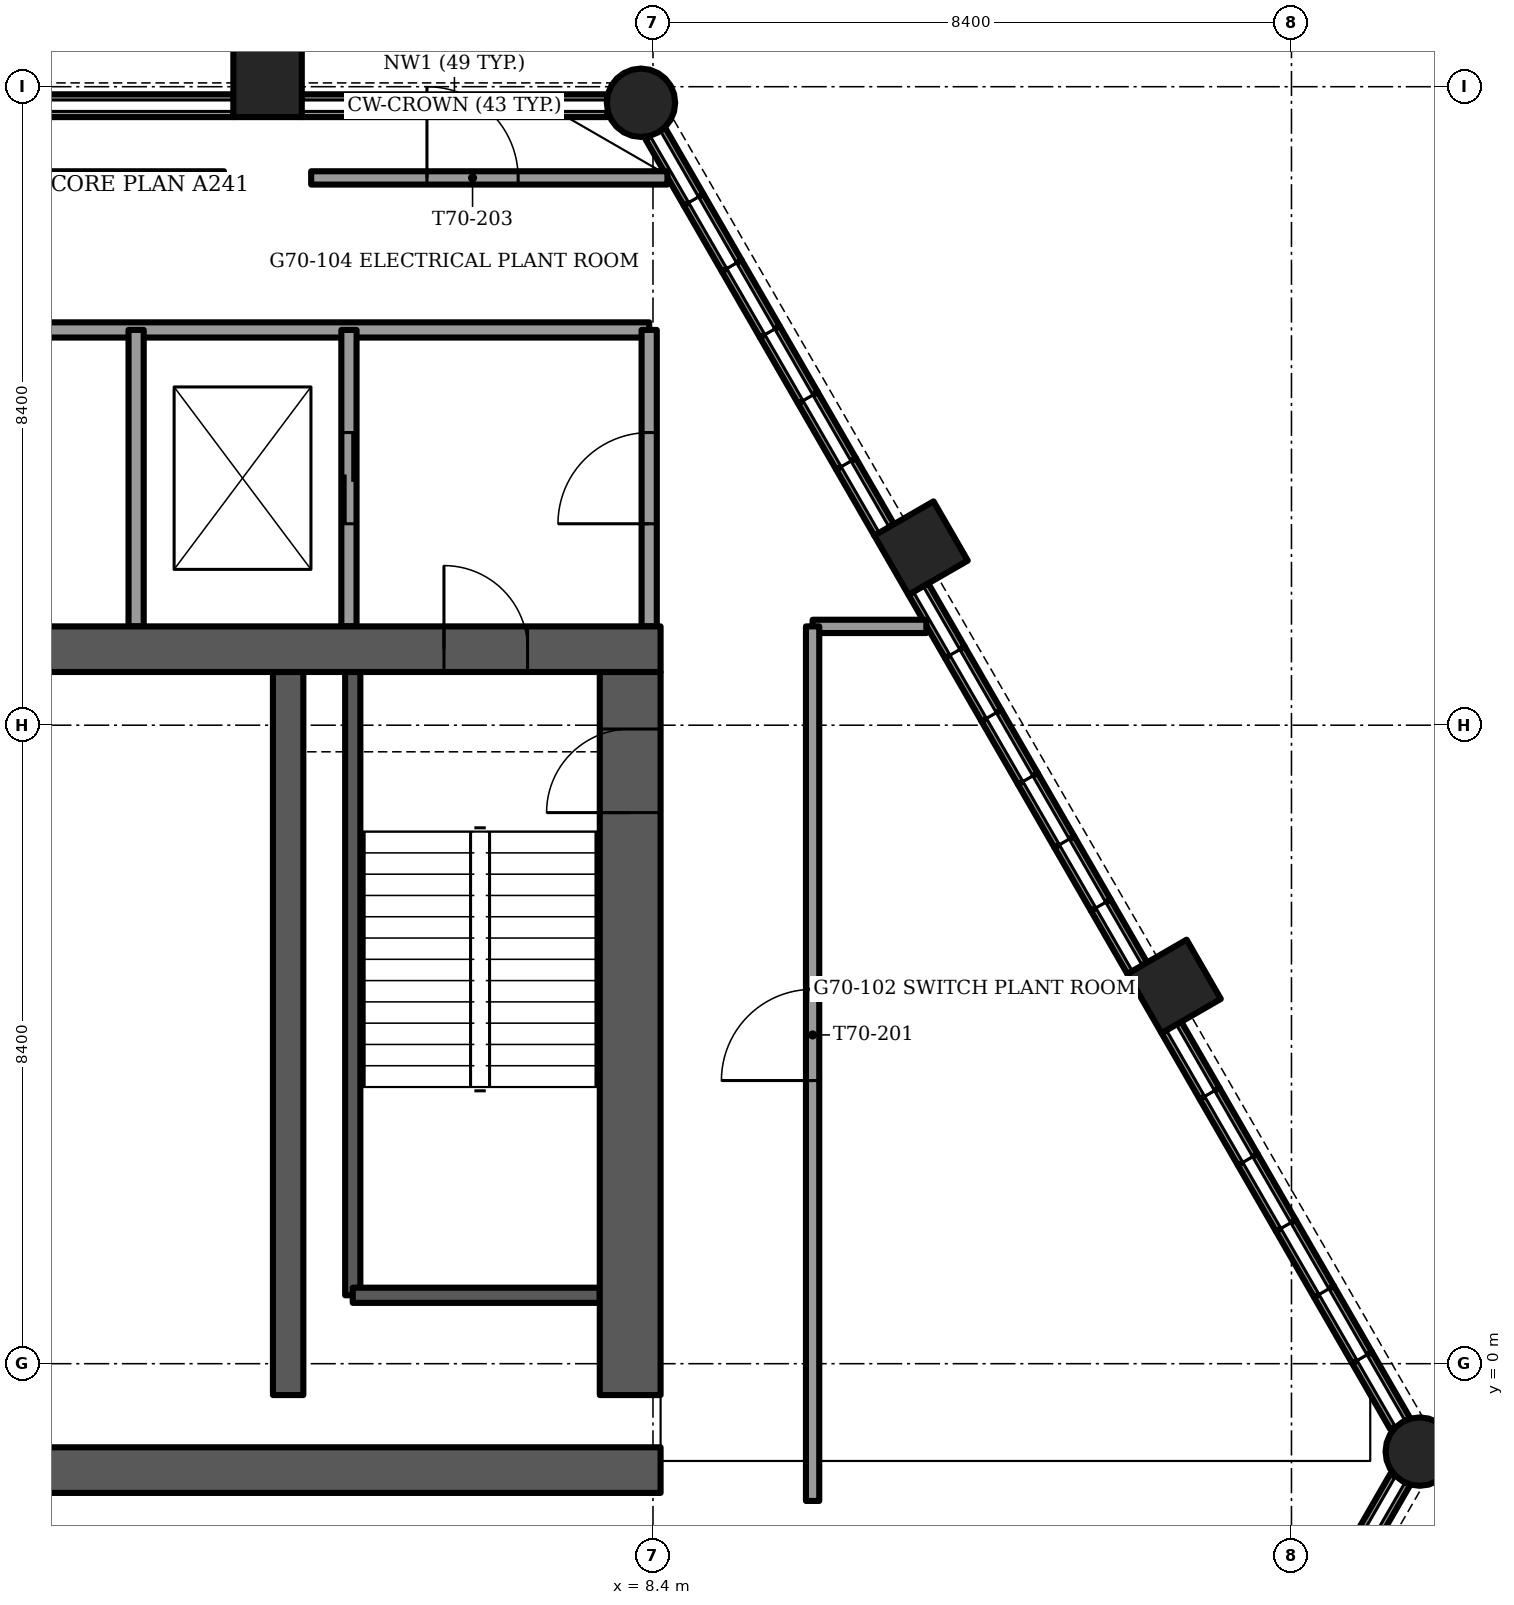
"""IFC4 building model, lengths in metres.
Left out: names, types, materials, properties, quantities, classifications, styles, units other than length and angle.
Written with IfcOpenShell. Run it as: python <this file> out.ifc"""

import sys

from ifc_helpers import new_model, si_unit, direction, frame, frame_2d, origin, origin_2d, place, context, subcontext, project, spatial, rectangle, circle, extrude, element, fill, save


model = new_model("IFC4")
c1 = context("Model", 3, precision=1e-05, world=origin(), true_north=direction((0.0, 1.0)))
c2 = subcontext(c1, "Body", "Model", "MODEL_VIEW")
j1 = project(units=[si_unit("LENGTHUNIT", "METRE"), si_unit("PLANEANGLEUNIT", "RADIAN")], contexts=[c1])
p1 = place(None, origin())
s1 = spatial("IfcSite", under=j1, at=p1, CompositionType="ELEMENT")
p2 = place(p1, origin())
s2 = spatial("IfcBuilding", under=s1, at=p2, CompositionType="ELEMENT")
p3 = place(p2, frame((0.0, 0.0, 284.0)))
s3 = spatial("IfcBuildingStorey", under=s2, at=p3, CompositionType="ELEMENT", Elevation=284.0)
p4 = place(p3, frame((-8.5, -1.4, -0.3), z_axis=(0.0, 0.0, 1.0), x_axis=(1.0, 0.0, 0.0)))
e1 = element("IfcWall", 1, at=p4, inside=s3, PredefinedType="SHEAR", context=c2, shape_type="SweptSolid", body=[
    extrude(rectangle(XDim=17.0, YDim=0.6, at=frame_2d((8.5, 0.0))), origin(), (0.0, 0.0, 1.0), 3.57),
])
p5 = place(p3, frame((-8.5, 9.4, -0.3), z_axis=(0.0, 0.0, 1.0), x_axis=(1.0, 0.0, 0.0)))
e2 = element("IfcWall", 2, at=p5, inside=s3, PredefinedType="SHEAR", context=c2, shape_type="SweptSolid", body=[
    extrude(rectangle(XDim=17.0, YDim=0.6, at=frame_2d((8.5, 0.0))), origin(), (0.0, 0.0, 1.0), 4.5),
])
p6 = place(p5, frame((1.75, 0.0, 0.0)))
e3 = element("IfcOpeningElement", 3, at=p6, cuts=e2, PredefinedType="OPENING", context=c2, shape_type="SweptSolid", body=[
    extrude(rectangle(XDim=1.1, YDim=2.1, at=frame_2d((0.55, 1.05))), frame((0.0, 0.3, 0.0), z_axis=(0.0, -1.0, 0.0), x_axis=(1.0, 0.0, 0.0)), (0.0, 0.0, 1.0), 0.6),
])
p7 = place(p5, frame((14.15, 0.0, 0.0)))
e4 = element("IfcOpeningElement", 4, at=p7, cuts=e2, PredefinedType="OPENING", context=c2, shape_type="SweptSolid", body=[
    extrude(rectangle(XDim=1.1, YDim=2.1, at=frame_2d((0.55, 1.05))), frame((0.0, 0.3, 0.0), z_axis=(0.0, -1.0, 0.0), x_axis=(1.0, 0.0, 0.0)), (0.0, 0.0, 1.0), 0.6),
])
p8 = place(p3, frame((8.1, -0.413, -0.3), z_axis=(0.0, 0.0, 1.0), x_axis=(0.0, 1.0, 0.0)))
e5 = element("IfcWall", 5, at=p8, inside=s3, PredefinedType="SHEAR", context=c2, shape_type="SweptSolid", body=[
    extrude(rectangle(XDim=9.513, YDim=0.8, at=frame_2d((4.756, 0.0))), origin(), (0.0, 0.0, 1.0), 4.5),
])
p9 = place(p8, frame((7.663, 0.0, 0.0)))
e6 = element("IfcOpeningElement", 6, at=p9, cuts=e5, PredefinedType="OPENING", context=c2, shape_type="SweptSolid", body=[
    extrude(rectangle(XDim=1.1, YDim=2.1, at=frame_2d((0.55, 1.05))), frame((0.0, 0.4, 0.0), z_axis=(0.0, -1.0, 0.0), x_axis=(1.0, 0.0, 0.0)), (0.0, 0.0, 1.0), 0.8),
])
p10 = place(p3, frame((3.6, -0.413, -0.3), z_axis=(0.0, 0.0, 1.0), x_axis=(0.0, 1.0, 0.0)))
e7 = element("IfcWall", 7, at=p10, inside=s3, PredefinedType="SHEAR", context=c2, shape_type="SweptSolid", body=[
    extrude(rectangle(XDim=9.513, YDim=0.4, at=frame_2d((4.756, 0.0))), origin(), (0.0, 0.0, 1.0), 4.5),
])
for number, where, z_axis, x_axis in (
    (8, (18.487, -1.156, -1.2), (0.0, 0.0, 1.0), (1.0, 0.0, 0.0)),
    (9, (8.242, 16.589, -1.2), (0.0, 0.0, 1.0), (1.0, 0.0, 0.0)),
):
    element("IfcColumn", number, at=place(p3, frame(where, z_axis=z_axis, x_axis=x_axis)), inside=s3, PredefinedType="COLUMN", context=c2, shape_type="SweptSolid", body=[
        extrude(circle(Radius=0.45, at=origin_2d()), origin(), (0.0, 0.0, 1.0), 4.5),
    ])
for number, where, z_axis, x_axis in (
    (10, (3.329, 16.85, -1.2), (0.0, 0.0, 1.0), (1.0, 0.0, 0.0)),
    (11, (15.256, 4.963, -1.2), (0.0, 0.0, 1.0), (0.5, -0.866, 0.0)),
    (12, (11.926, 10.73, -1.2), (0.0, 0.0, 1.0), (0.5, -0.866, 0.0)),
):
    element("IfcColumn", number, at=place(p3, frame(where, z_axis=z_axis, x_axis=x_axis)), inside=s3, PredefinedType="COLUMN", context=c2, shape_type="SweptSolid", body=[
        extrude(rectangle(XDim=0.9, YDim=0.9, at=origin_2d()), origin(), (0.0, 0.0, 1.0), 4.5),
    ])
p11 = place(p3, frame((7.796, 16.55, 0.0), z_axis=(0.0, 0.0, 1.0), x_axis=(-1.0, 0.0, 0.0)))
e13 = element("IfcWall", 13, at=p11, inside=s3, PredefinedType="SOLIDWALL", context=c2, shape_type="SweptSolid", body=[
    extrude(rectangle(XDim=4.017, YDim=0.3, at=frame_2d((2.008, 0.0))), origin(), (0.0, 0.0, 1.0), 1.0),
])
p12 = place(p3, frame((2.879, 16.55, 0.0), z_axis=(0.0, 0.0, 1.0), x_axis=(-1.0, 0.0, 0.0)))
e14 = element("IfcWall", 14, at=p12, inside=s3, PredefinedType="SOLIDWALL", context=c2, shape_type="SweptSolid", body=[
    extrude(rectangle(XDim=5.759, YDim=0.3, at=frame_2d((2.879, 0.0))), origin(), (0.0, 0.0, 1.0), 1.0),
])
p13 = place(p3, frame((17.728, -2.394, 0.0), z_axis=(0.0, 0.0, 1.0), x_axis=(0.500010157896, 0.866019539041, 0.0)))
e15 = element("IfcWall", 15, at=p13, inside=s3, PredefinedType="SOLIDWALL", context=c2, shape_type="SweptSolid", body=[
    extrude(rectangle(XDim=1.004, YDim=0.3, at=frame_2d((0.502, 0.0))), origin(), (0.0, 0.0, 1.0), 1.0),
])
for number, where, z_axis, x_axis in (
    (16, (18.23, -0.788, 0.0), (0.0, 0.0, 1.0), (-0.5, 0.866, 0.0)),
    (17, (17.729, 0.08, 0.0), (0.0, 0.0, 1.0), (-0.5, 0.866, 0.0)),
    (18, (17.227, 0.949, 0.0), (0.0, 0.0, 1.0), (-0.5, 0.866, 0.0)),
    (19, (16.726, 1.818, 0.0), (0.0, 0.0, 1.0), (-0.5, 0.866, 0.0)),
):
    element("IfcWall", number, at=place(p3, frame(where, z_axis=z_axis, x_axis=x_axis)), inside=s3, PredefinedType="SOLIDWALL", context=c2, shape_type="SweptSolid", body=[
        extrude(rectangle(XDim=1.003, YDim=0.3, at=frame_2d((0.501, 0.0))), origin(), (0.0, 0.0, 1.0), 1.0),
    ])
p14 = place(p3, frame((16.224, 2.686, 0.0), z_axis=(0.0, 0.0, 1.0), x_axis=(-0.500143783026, 0.865942374699, 0.0)))
e20 = element("IfcWall", 20, at=p14, inside=s3, PredefinedType="SOLIDWALL", context=c2, shape_type="SweptSolid", body=[
    extrude(rectangle(XDim=1.003, YDim=0.3, at=frame_2d((0.501, 0.0))), origin(), (0.0, 0.0, 1.0), 1.0),
])
p15 = place(p3, frame((15.722, 3.555, 0.0), z_axis=(0.0, 0.0, 1.0), x_axis=(-0.499961250474, 0.866047774678, 0.0)))
e21 = element("IfcWall", 21, at=p15, inside=s3, PredefinedType="SOLIDWALL", context=c2, shape_type="SweptSolid", body=[
    extrude(rectangle(XDim=1.003, YDim=0.3, at=frame_2d((0.501, 0.0))), origin(), (0.0, 0.0, 1.0), 1.0),
])
p16 = place(p3, frame((14.771, 5.203, 0.0), z_axis=(0.0, 0.0, 1.0), x_axis=(-0.500133489192, 0.865948320045, 0.0)))
e22 = element("IfcWall", 22, at=p16, inside=s3, PredefinedType="SOLIDWALL", context=c2, shape_type="SweptSolid", body=[
    extrude(rectangle(XDim=0.96, YDim=0.3, at=frame_2d((0.48, 0.0))), origin(), (0.0, 0.0, 1.0), 1.0),
])
p17 = place(p3, frame((14.291, 6.034, 0.0), z_axis=(0.0, 0.0, 1.0), x_axis=(-0.500023335103, 0.866011930837, 0.0)))
e23 = element("IfcWall", 23, at=p17, inside=s3, PredefinedType="SOLIDWALL", context=c2, shape_type="SweptSolid", body=[
    extrude(rectangle(XDim=0.96, YDim=0.3, at=frame_2d((0.48, 0.0))), origin(), (0.0, 0.0, 1.0), 1.0),
])
p18 = place(p3, frame((13.811, 6.865, 0.0), z_axis=(0.0, 0.0, 1.0), x_axis=(-0.499832553123, 0.866122057702, 0.0)))
e24 = element("IfcWall", 24, at=p18, inside=s3, PredefinedType="SOLIDWALL", context=c2, shape_type="SweptSolid", body=[
    extrude(rectangle(XDim=0.96, YDim=0.3, at=frame_2d((0.48, 0.0))), origin(), (0.0, 0.0, 1.0), 1.0),
])
p19 = place(p3, frame((13.331, 7.697, 0.0), z_axis=(0.0, 0.0, 1.0), x_axis=(-0.500023335103, 0.866011930837, 0.0)))
e25 = element("IfcWall", 25, at=p19, inside=s3, PredefinedType="SOLIDWALL", context=c2, shape_type="SweptSolid", body=[
    extrude(rectangle(XDim=0.96, YDim=0.3, at=frame_2d((0.48, 0.0))), origin(), (0.0, 0.0, 1.0), 1.0),
])
for number, where, z_axis, x_axis in (
    (26, (12.851, 8.528, 0.0), (0.0, 0.0, 1.0), (-0.5, 0.866, 0.0)),
    (27, (12.371, 9.359, 0.0), (0.0, 0.0, 1.0), (-0.5, 0.866, 0.0)),
):
    element("IfcWall", number, at=place(p3, frame(where, z_axis=z_axis, x_axis=x_axis)), inside=s3, PredefinedType="SOLIDWALL", context=c2, shape_type="SweptSolid", body=[
        extrude(rectangle(XDim=0.96, YDim=0.3, at=frame_2d((0.48, 0.0))), origin(), (0.0, 0.0, 1.0), 1.0),
    ])
for number, where, z_axis, x_axis in (
    (28, (11.441, 10.97, 0.0), (0.0, 0.0, 1.0), (-0.5, 0.866, 0.0)),
    (29, (10.94, 11.839, 0.0), (0.0, 0.0, 1.0), (-0.5, 0.866, 0.0)),
    (30, (10.438, 12.707, 0.0), (0.0, 0.0, 1.0), (-0.5, 0.866, 0.0)),
):
    element("IfcWall", number, at=place(p3, frame(where, z_axis=z_axis, x_axis=x_axis)), inside=s3, PredefinedType="SOLIDWALL", context=c2, shape_type="SweptSolid", body=[
        extrude(rectangle(XDim=1.003, YDim=0.3, at=frame_2d((0.501, 0.0))), origin(), (0.0, 0.0, 1.0), 1.0),
    ])
p20 = place(p3, frame((9.937, 13.576, 0.0), z_axis=(0.0, 0.0, 1.0), x_axis=(-0.499961250474, 0.866047774678, 0.0)))
e31 = element("IfcWall", 31, at=p20, inside=s3, PredefinedType="SOLIDWALL", context=c2, shape_type="SweptSolid", body=[
    extrude(rectangle(XDim=1.003, YDim=0.3, at=frame_2d((0.501, 0.0))), origin(), (0.0, 0.0, 1.0), 1.0),
])
p21 = place(p3, frame((9.435, 14.445, 0.0), z_axis=(0.0, 0.0, 1.0), x_axis=(-0.500038395149, 0.8660032352, 0.0)))
e32 = element("IfcWall", 32, at=p21, inside=s3, PredefinedType="SOLIDWALL", context=c2, shape_type="SweptSolid", body=[
    extrude(rectangle(XDim=1.003, YDim=0.3, at=frame_2d((0.502, 0.0))), origin(), (0.0, 0.0, 1.0), 1.0),
])
p22 = place(p3, frame((8.934, 15.314, 0.0), z_axis=(0.0, 0.0, 1.0), x_axis=(-0.500143783026, 0.865942374699, 0.0)))
e33 = element("IfcWall", 33, at=p22, inside=s3, PredefinedType="SOLIDWALL", context=c2, shape_type="SweptSolid", body=[
    extrude(rectangle(XDim=1.003, YDim=0.3, at=frame_2d((0.501, 0.0))), origin(), (0.0, 0.0, 1.0), 1.0),
])
p23 = place(p3, frame((10.5, 9.7, 0.0), z_axis=(0.0, 0.0, 1.0), x_axis=(1.0, 0.0, 0.0)))
e34 = element("IfcWall", 34, at=p23, inside=s3, PredefinedType="PARTITIONING", context=c2, shape_type="SweptSolid", body=[
    extrude(rectangle(XDim=1.496, YDim=0.175, at=frame_2d((0.748, 0.0))), origin(), (0.0, 0.0, 1.0), 4.2),
])
p24 = place(p3, frame((-2.756, 15.6, 0.0), z_axis=(0.0, 0.0, 1.0), x_axis=(1.0, 0.0, 0.0)))
e35 = element("IfcWall", 35, at=p24, inside=s3, PredefinedType="PARTITIONING", context=c2, shape_type="SweptSolid", body=[
    extrude(rectangle(XDim=5.512, YDim=0.175, at=frame_2d((2.756, 0.0))), origin(), (0.0, 0.0, 1.0), 4.2),
])
p25 = place(p3, frame((3.903, 15.6, 0.0), z_axis=(0.0, 0.0, 1.0), x_axis=(1.0, 0.0, 0.0)))
e36 = element("IfcWall", 36, at=p25, inside=s3, PredefinedType="PARTITIONING", context=c2, shape_type="SweptSolid", body=[
    extrude(rectangle(XDim=4.687, YDim=0.175, at=frame_2d((2.344, 0.0))), origin(), (0.0, 0.0, 1.0), 4.2),
])
p26 = place(p25, frame((1.523, 0.0, 0.0)))
e37 = element("IfcOpeningElement", 37, at=p26, cuts=e36, PredefinedType="OPENING", context=c2, shape_type="SweptSolid", body=[
    extrude(rectangle(XDim=1.2, YDim=2.1, at=frame_2d((0.6, 1.05))), frame((0.0, 0.087, 0.0), z_axis=(0.0, -1.0, 0.0), x_axis=(1.0, 0.0, 0.0)), (0.0, 0.0, 1.0), 0.175),
])
p27 = place(p3, frame((10.5, -1.806, 0.0), z_axis=(0.0, 0.0, 1.0), x_axis=(0.0, 1.0, 0.0)))
e38 = element("IfcWall", 38, at=p27, inside=s3, PredefinedType="PARTITIONING", context=c2, shape_type="SweptSolid", body=[
    extrude(rectangle(XDim=11.506, YDim=0.175, at=frame_2d((5.753, 0.0))), origin(), (0.0, 0.0, 1.0), 4.155),
])
p28 = place(p27, frame((5.531, 0.0, 0.0)))
e39 = element("IfcOpeningElement", 39, at=p28, cuts=e38, PredefinedType="OPENING", context=c2, shape_type="SweptSolid", body=[
    extrude(rectangle(XDim=1.2, YDim=2.1, at=frame_2d((0.6, 1.05))), frame((0.0, 0.087, 0.0), z_axis=(0.0, -1.0, 0.0), x_axis=(1.0, 0.0, 0.0)), (0.0, 0.0, 1.0), 0.175),
])
p29 = place(p3, frame((4.45, 0.9, -0.3), z_axis=(0.0, 0.0, 1.0), x_axis=(0.0, 1.0, 0.0)))
e40 = element("IfcWall", 40, at=p29, inside=s3, PredefinedType="SOLIDWALL", context=c2, shape_type="SweptSolid", body=[
    extrude(rectangle(XDim=8.2, YDim=0.2, at=frame_2d((4.1, 0.0))), origin(), (0.0, 0.0, 1.0), 4.5),
])
p30 = place(p3, frame((4.45, 0.9, -0.3), z_axis=(0.0, 0.0, 1.0), x_axis=(1.0, 0.0, 0.0)))
e41 = element("IfcWall", 41, at=p30, inside=s3, PredefinedType="SOLIDWALL", context=c2, shape_type="SweptSolid", body=[
    extrude(rectangle(XDim=3.25, YDim=0.2, at=frame_2d((1.625, 0.0))), origin(), (0.0, 0.0, 1.0), 4.5),
])
p31 = place(p3, frame((-8.35, 13.6, 0.0), z_axis=(0.0, 0.0, 1.0), x_axis=(1.0, 0.0, 0.0)))
e42 = element("IfcWall", 42, at=p31, inside=s3, PredefinedType="PARTITIONING", context=c2, shape_type="SweptSolid", body=[
    extrude(rectangle(XDim=16.7, YDim=0.2, at=frame_2d((8.35, 0.0))), origin(), (0.0, 0.0, 1.0), 4.2),
])
p32 = place(p3, frame((8.35, 9.7, 0.0), z_axis=(0.0, 0.0, 1.0), x_axis=(0.0, 1.0, 0.0)))
e43 = element("IfcWall", 43, at=p32, inside=s3, PredefinedType="PARTITIONING", context=c2, shape_type="SweptSolid", body=[
    extrude(rectangle(XDim=3.9, YDim=0.2, at=frame_2d((1.95, 0.0))), origin(), (0.0, 0.0, 1.0), 4.2),
])
p33 = place(p32, frame((1.35, 0.0, 0.0)))
e44 = element("IfcOpeningElement", 44, at=p33, cuts=e43, PredefinedType="OPENING", context=c2, shape_type="SweptSolid", body=[
    extrude(rectangle(XDim=1.2, YDim=2.1, at=frame_2d((0.6, 1.05))), frame((0.0, 0.1, 0.0), z_axis=(0.0, -1.0, 0.0), x_axis=(1.0, 0.0, 0.0)), (0.0, 0.0, 1.0), 0.2),
])
p34 = place(p3, frame((4.4, 9.7, 0.0), z_axis=(0.0, 0.0, 1.0), x_axis=(0.0, 1.0, 0.0)))
e45 = element("IfcWall", 45, at=p34, inside=s3, PredefinedType="PARTITIONING", context=c2, shape_type="SweptSolid", body=[
    extrude(rectangle(XDim=3.9, YDim=0.2, at=frame_2d((1.95, 0.0))), origin(), (0.0, 0.0, 1.0), 4.2),
])
p35 = place(p34, frame((1.35, 0.0, 0.0)))
e46 = element("IfcOpeningElement", 46, at=p35, cuts=e45, PredefinedType="OPENING", context=c2, shape_type="SweptSolid", body=[
    extrude(rectangle(XDim=1.2, YDim=2.1, at=frame_2d((0.6, 1.05))), frame((0.0, 0.1, 0.0), z_axis=(0.0, -1.0, 0.0), x_axis=(1.0, 0.0, 0.0)), (0.0, 0.0, 1.0), 0.2),
])
p36 = place(p3, frame((1.6, 9.7, 0.0), z_axis=(0.0, 0.0, 1.0), x_axis=(0.0, 1.0, 0.0)))
e47 = element("IfcWall", 47, at=p36, inside=s3, PredefinedType="PARTITIONING", context=c2, shape_type="SweptSolid", body=[
    extrude(rectangle(XDim=3.9, YDim=0.2, at=frame_2d((1.95, 0.0))), origin(), (0.0, 0.0, 1.0), 4.2),
])
p37 = place(p28, origin())
e48 = element("IfcDoor", 48, at=p37, inside=s3, OperationType="SINGLE_SWING_LEFT", PredefinedType="DOOR", context=c2, shape_type="SweptSolid", body=[
    extrude(rectangle(XDim=1.2, YDim=2.1, at=frame_2d((0.6, 1.05))), frame((0.0, 0.025, 0.0), z_axis=(0.0, -1.0, 0.0), x_axis=(1.0, 0.0, 0.0)), (0.0, 0.0, 1.0), 0.05),
])
fill(e39, e48)
p38 = place(p26, origin())
e49 = element("IfcDoor", 49, at=p38, inside=s3, OperationType="SINGLE_SWING_LEFT", PredefinedType="DOOR", context=c2, shape_type="SweptSolid", body=[
    extrude(rectangle(XDim=1.2, YDim=2.1, at=frame_2d((0.6, 1.05))), frame((0.0, 0.025, 0.0), z_axis=(0.0, -1.0, 0.0), x_axis=(1.0, 0.0, 0.0)), (0.0, 0.0, 1.0), 0.05),
])
fill(e37, e49)
p39 = place(p7, origin())
e50 = element("IfcDoor", 50, at=p39, inside=s3, OperationType="SINGLE_SWING_RIGHT", PredefinedType="DOOR", context=c2, shape_type="SweptSolid", body=[
    extrude(rectangle(XDim=1.1, YDim=2.1, at=frame_2d((0.55, 1.05))), frame((0.0, 0.025, 0.0), z_axis=(0.0, -1.0, 0.0), x_axis=(1.0, 0.0, 0.0)), (0.0, 0.0, 1.0), 0.05),
])
fill(e4, e50)
p40 = place(p9, origin())
e51 = element("IfcDoor", 51, at=p40, inside=s3, OperationType="SINGLE_SWING_LEFT", PredefinedType="DOOR", context=c2, shape_type="SweptSolid", body=[
    extrude(rectangle(XDim=1.1, YDim=2.1, at=frame_2d((0.55, 1.05))), frame((0.0, 0.025, 0.0), z_axis=(0.0, -1.0, 0.0), x_axis=(1.0, 0.0, 0.0)), (0.0, 0.0, 1.0), 0.05),
])
fill(e6, e51)
p41 = place(p35, origin())
e52 = element("IfcDoor", 52, at=p41, inside=s3, OperationType="SLIDING_TO_LEFT", PredefinedType="DOOR", context=c2, shape_type="SweptSolid", body=[
    extrude(rectangle(XDim=1.2, YDim=2.1, at=frame_2d((0.6, 1.05))), frame((0.0, 0.025, 0.0), z_axis=(0.0, -1.0, 0.0), x_axis=(1.0, 0.0, 0.0)), (0.0, 0.0, 1.0), 0.05),
])
fill(e46, e52)
p42 = place(p33, origin())
e53 = element("IfcDoor", 53, at=p42, inside=s3, OperationType="SINGLE_SWING_LEFT", PredefinedType="DOOR", context=c2, shape_type="SweptSolid", body=[
    extrude(rectangle(XDim=1.2, YDim=2.1, at=frame_2d((0.6, 1.05))), frame((0.0, 0.025, 0.0), z_axis=(0.0, -1.0, 0.0), x_axis=(1.0, 0.0, 0.0)), (0.0, 0.0, 1.0), 0.05),
])
fill(e44, e53)
save(model, sys.argv[1])
